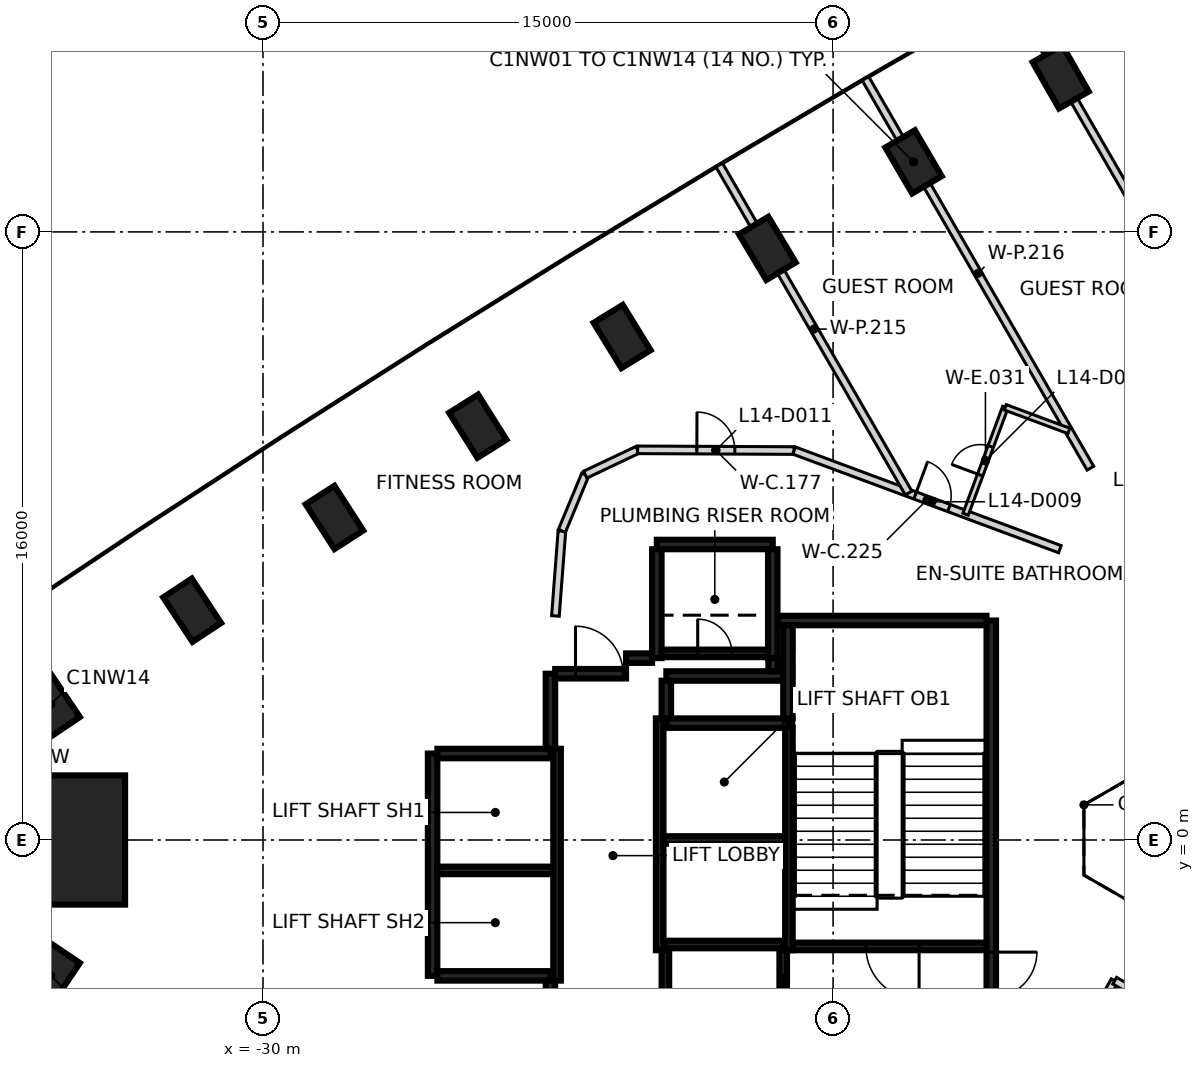
"""IFC4 building model, lengths in metres.
Left out: names, types, materials, properties, quantities, classifications, styles, units other than length and angle.
Written with IfcOpenShell. Run it as: python <this file> out.ifc"""

import sys

from ifc_helpers import new_model, si_unit, direction, frame, frame_2d, origin, origin_2d, place, context, subcontext, project, spatial, rectangle, extrude, element, fill, save


model = new_model("IFC4")
c1 = context("Model", 3, precision=1e-05, world=origin(), true_north=direction((0.0, 1.0)))
c2 = subcontext(c1, "Body", "Model", "MODEL_VIEW")
j1 = project(units=[si_unit("LENGTHUNIT", "METRE"), si_unit("PLANEANGLEUNIT", "RADIAN")], contexts=[c1])
p1 = place(None, origin())
s1 = spatial("IfcSite", under=j1, at=p1, CompositionType="ELEMENT")
p2 = place(p1, origin())
s2 = spatial("IfcBuilding", under=s1, at=p2, CompositionType="ELEMENT")
p3 = place(p2, frame((0.0, 0.0, 63.8)))
s3 = spatial("IfcBuildingStorey", under=s2, at=p3, CompositionType="ELEMENT", Elevation=63.8)
for number, where, z_axis, x_axis in (
    (1, (-9.011, 20.079, -0.475), (0.0, 0.0, 1.0), (-0.495, 0.869, 0.0)),
    (2, (-12.883, 17.844, -0.475), (0.0, 0.0, 1.0), (-0.505, 0.863, 0.0)),
    (3, (-16.73, 15.566, -0.475), (0.0, 0.0, 1.0), (-0.514, 0.858, 0.0)),
    (4, (-20.552, 13.248, -0.475), (0.0, 0.0, 1.0), (-0.523, 0.852, 0.0)),
    (5, (-24.349, 10.888, -0.475), (0.0, 0.0, 1.0), (-0.532, 0.846, 0.0)),
    (6, (-28.12, 8.488, -0.475), (0.0, 0.0, 1.0), (-0.541, 0.841, 0.0)),
    (7, (-31.865, 6.046, -0.475), (0.0, 0.0, 1.0), (-0.551, 0.835, 0.0)),
    (8, (-35.583, 3.565, -0.475), (0.0, 0.0, 1.0), (-0.559, 0.829, 0.0)),
    (9, (-35.583, -3.565, -0.475), (0.0, 0.0, 1.0), (0.559, 0.829, 0.0)),
):
    element("IfcColumn", number, at=place(p3, frame(where, z_axis=z_axis, x_axis=x_axis)), inside=s3, PredefinedType="COLUMN", context=c2, shape_type="SweptSolid", body=[
        extrude(rectangle(XDim=1.4, YDim=0.9, at=origin_2d()), origin(), (0.0, 0.0, 1.0), 3.6),
    ])
p4 = place(p3, frame((-35.729, 0.0, -0.475), z_axis=(0.0, 0.0, 1.0), x_axis=(1.0, 0.0, 0.0)))
e10 = element("IfcColumn", 10, at=p4, inside=s3, PredefinedType="COLUMN", context=c2, shape_type="SweptSolid", body=[
    extrude(rectangle(XDim=4.2, YDim=3.4, at=origin_2d()), origin(), (0.0, 0.0, 1.0), 3.6),
])
p5 = place(p3, frame((-10.837, 5.775, 0.0), z_axis=(0.0, 0.0, 1.0), x_axis=(0.0, -1.0, 0.0)))
e11 = element("IfcWall", 11, at=p5, inside=s3, PredefinedType="SHEAR", context=c2, shape_type="SweptSolid", body=[
    extrude(rectangle(XDim=11.55, YDim=0.25, at=frame_2d((5.775, 0.0))), origin(), (0.0, 0.0, 1.0), 3.125),
])
p6 = place(p5, frame((10.025, 0.0, 0.0)))
e12 = element("IfcOpeningElement", 12, at=p6, cuts=e11, PredefinedType="OPENING", context=c2, shape_type="SweptSolid", body=[
    extrude(rectangle(XDim=1.2, YDim=2.1, at=frame_2d((0.6, 1.05))), frame((0.0, 0.135, 0.0), z_axis=(0.0, -1.0, 0.0), x_axis=(1.0, 0.0, 0.0)), (0.0, 0.0, 1.0), 0.27),
])
p7 = place(p5, frame((8.725, 0.0, 0.0)))
e13 = element("IfcOpeningElement", 13, at=p7, cuts=e11, PredefinedType="OPENING", context=c2, shape_type="SweptSolid", body=[
    extrude(rectangle(XDim=1.2, YDim=2.1, at=frame_2d((0.6, 1.05))), frame((0.0, 0.135, 0.0), z_axis=(0.0, -1.0, 0.0), x_axis=(1.0, 0.0, 0.0)), (0.0, 0.0, 1.0), 0.27),
])
p8 = place(p3, frame((-25.537, -3.575, 0.0), z_axis=(0.0, 0.0, 1.0), x_axis=(0.0, 1.0, 0.0)))
e14 = element("IfcWall", 14, at=p8, inside=s3, PredefinedType="SHEAR", context=c2, shape_type="SweptSolid", body=[
    extrude(rectangle(XDim=5.85, YDim=0.25, at=frame_2d((2.925, 0.0))), origin(), (0.0, 0.0, 1.0), 3.125),
])
p9 = place(p3, frame((-16.472, 5.775, 0.0), z_axis=(0.0, 0.0, 1.0), x_axis=(1.0, 0.0, 0.0)))
e15 = element("IfcWall", 15, at=p9, inside=s3, PredefinedType="SHEAR", context=c2, shape_type="SweptSolid", body=[
    extrude(rectangle(XDim=5.51, YDim=0.25, at=frame_2d((2.755, 0.0))), origin(), (0.0, 0.0, 1.0), 3.125),
])
p10 = place(p3, frame((-19.387, 3.075, 0.0), z_axis=(0.0, 0.0, 1.0), x_axis=(1.0, 0.0, 0.0)))
e16 = element("IfcWall", 16, at=p10, inside=s3, PredefinedType="SHEAR", context=c2, shape_type="SweptSolid", body=[
    extrude(rectangle(XDim=3.2, YDim=0.25, at=frame_2d((1.6, 0.0))), origin(), (0.0, 0.0, 1.0), 3.125),
])
for number, where, z_axis, x_axis in (
    (17, (-22.437, -3.575, 0.0), (0.0, 0.0, 1.0), (-1.0, 0.0, 0.0)),
    (18, (-25.412, 2.275, 0.0), (0.0, 0.0, 1.0), (1.0, 0.0, 0.0)),
):
    element("IfcWall", number, at=place(p3, frame(where, z_axis=z_axis, x_axis=x_axis)), inside=s3, PredefinedType="SHEAR", context=c2, shape_type="SweptSolid", body=[
        extrude(rectangle(XDim=2.975, YDim=0.25, at=frame_2d((1.487, 0.0))), origin(), (0.0, 0.0, 1.0), 3.125),
    ])
p11 = place(p3, frame((-19.637, 7.775, 0.0), z_axis=(0.0, 0.0, 1.0), x_axis=(1.0, 0.0, 0.0)))
e19 = element("IfcWall", 19, at=p11, inside=s3, PredefinedType="SHEAR", context=c2, shape_type="SweptSolid", body=[
    extrude(rectangle(XDim=3.05, YDim=0.25, at=frame_2d((1.525, 0.0))), origin(), (0.0, 0.0, 1.0), 3.125),
])
for number, where, z_axis, x_axis in (
    (20, (-16.587, 7.65, 0.0), (0.0, 0.0, 1.0), (0.0, -1.0, 0.0)),
    (21, (-19.637, 4.785, 0.0), (0.0, 0.0, 1.0), (0.0, 1.0, 0.0)),
):
    element("IfcWall", number, at=place(p3, frame(where, z_axis=z_axis, x_axis=x_axis)), inside=s3, PredefinedType="SHEAR", context=c2, shape_type="SweptSolid", body=[
        extrude(rectangle(XDim=2.865, YDim=0.25, at=frame_2d((1.432, 0.0))), origin(), (0.0, 0.0, 1.0), 3.125),
    ])
p12 = place(p3, frame((-16.302, 4.315, 0.0), z_axis=(0.0, 0.0, 1.0), x_axis=(-1.0, 0.0, 0.0)))
e22 = element("IfcWall", 22, at=p12, inside=s3, PredefinedType="SHEAR", context=c2, shape_type="SweptSolid", body=[
    extrude(rectangle(XDim=3.085, YDim=0.25, at=frame_2d((1.542, 0.0))), origin(), (0.0, 0.0, 1.0), 3.125),
])
p13 = place(p3, frame((-16.187, 3.2, 0.0), z_axis=(0.0, 0.0, 1.0), x_axis=(0.0, 1.0, 0.0)))
e23 = element("IfcWall", 23, at=p13, inside=s3, PredefinedType="SHEAR", context=c2, shape_type="SweptSolid", body=[
    extrude(rectangle(XDim=2.449, YDim=0.25, at=frame_2d((1.225, 0.0))), origin(), (0.0, 0.0, 1.0), 3.125),
])
p14 = place(p3, frame((-22.437, 2.4, 0.0), z_axis=(0.0, 0.0, 1.0), x_axis=(0.0, 1.0, 0.0)))
e24 = element("IfcWall", 24, at=p14, inside=s3, PredefinedType="SHEAR", context=c2, shape_type="SweptSolid", body=[
    extrude(rectangle(XDim=1.975, YDim=0.25, at=frame_2d((0.987, 0.0))), origin(), (0.0, 0.0, 1.0), 3.125),
])
p15 = place(p3, frame((-22.437, -5.55, 0.0), z_axis=(0.0, 0.0, 1.0), x_axis=(0.0, 1.0, 0.0)))
e25 = element("IfcWall", 25, at=p15, inside=s3, PredefinedType="SHEAR", context=c2, shape_type="SweptSolid", body=[
    extrude(rectangle(XDim=1.849, YDim=0.25, at=frame_2d((0.925, 0.0))), origin(), (0.0, 0.0, 1.0), 3.125),
])
p16 = place(p3, frame((-22.312, 4.375, 0.0), z_axis=(0.0, 0.0, 1.0), x_axis=(1.0, 0.0, 0.0)))
e26 = element("IfcWall", 26, at=p16, inside=s3, PredefinedType="SHEAR", context=c2, shape_type="SweptSolid", body=[
    extrude(rectangle(XDim=1.865, YDim=0.25, at=frame_2d((0.932, 0.0))), origin(), (0.0, 0.0, 1.0), 3.125),
])
p17 = place(p16, frame((0.535, 0.0, 0.0)))
e27 = element("IfcOpeningElement", 27, at=p17, cuts=e26, PredefinedType="OPENING", context=c2, shape_type="SweptSolid", body=[
    extrude(rectangle(XDim=1.25, YDim=2.1, at=frame_2d((0.625, 1.05))), frame((0.0, 0.135, 0.0), z_axis=(0.0, -1.0, 0.0), x_axis=(1.0, 0.0, 0.0)), (0.0, 0.0, 1.0), 0.27),
])
p18 = place(p3, frame((-19.387, 4.19, 0.0), z_axis=(0.0, 0.0, 1.0), x_axis=(0.0, -1.0, 0.0)))
e28 = element("IfcWall", 28, at=p18, inside=s3, PredefinedType="SHEAR", context=c2, shape_type="SweptSolid", body=[
    extrude(rectangle(XDim=0.989, YDim=0.25, at=frame_2d((0.495, 0.0))), origin(), (0.0, 0.0, 1.0), 3.125),
])
p19 = place(p3, frame((-20.447, 4.785, 0.0), z_axis=(0.0, 0.0, 1.0), x_axis=(1.0, 0.0, 0.0)))
e29 = element("IfcWall", 29, at=p19, inside=s3, PredefinedType="SHEAR", context=c2, shape_type="SweptSolid", body=[
    extrude(rectangle(XDim=0.685, YDim=0.25, at=frame_2d((0.342, 0.0))), origin(), (0.0, 0.0, 1.0), 3.125),
])
p20 = place(p3, frame((-16.577, 4.785, 0.0), z_axis=(0.0, 0.0, 1.0), x_axis=(0.0, -1.0, 0.0)))
e30 = element("IfcWall", 30, at=p20, inside=s3, PredefinedType="SHEAR", context=c2, shape_type="SweptSolid", body=[
    extrude(rectangle(XDim=0.344, YDim=0.25, at=frame_2d((0.172, 0.0))), origin(), (0.0, 0.0, 1.0), 3.125),
])
p21 = place(p3, frame((-16.162, 2.951, 0.0), z_axis=(0.0, 0.0, 1.0), x_axis=(0.0, -1.0, 0.0)))
e31 = element("IfcWall", 31, at=p21, inside=s3, PredefinedType="SHEAR", context=c2, shape_type="SweptSolid", body=[
    extrude(rectangle(XDim=5.851, YDim=0.2, at=frame_2d((2.925, 0.0))), origin(), (0.0, 0.0, 1.0), 3.125),
])
for number, where, z_axis, x_axis in (
    (32, (-19.562, -2.9, 0.0), (0.0, 0.0, 1.0), (0.0, 1.0, 0.0)),
    (33, (-22.262, 2.4, 0.0), (0.0, 0.0, 1.0), (0.0, -1.0, 0.0)),
):
    element("IfcWall", number, at=place(p3, frame(where, z_axis=z_axis, x_axis=x_axis)), inside=s3, PredefinedType="SHEAR", context=c2, shape_type="SweptSolid", body=[
        extrude(rectangle(XDim=6.1, YDim=0.2, at=frame_2d((3.05, 0.0))), origin(), (0.0, 0.0, 1.0), 3.125),
    ])
p22 = place(p3, frame((-10.963, -2.8, 0.0), z_axis=(0.0, 0.0, 1.0), x_axis=(-1.0, 0.0, 0.0)))
e34 = element("IfcWall", 34, at=p22, inside=s3, PredefinedType="SHEAR", context=c2, shape_type="SweptSolid", body=[
    extrude(rectangle(XDim=5.098, YDim=0.2, at=frame_2d((2.549, 0.0))), origin(), (0.0, 0.0, 1.0), 3.125),
])
p23 = place(p22, frame((1.774, 0.0, 0.0)))
e35 = element("IfcOpeningElement", 35, at=p23, cuts=e34, PredefinedType="OPENING", context=c2, shape_type="SweptSolid", body=[
    extrude(rectangle(XDim=1.4, YDim=2.1, at=frame_2d((0.7, 1.05))), frame((0.0, 0.11, 0.0), z_axis=(0.0, -1.0, 0.0), x_axis=(1.0, 0.0, 0.0)), (0.0, 0.0, 1.0), 0.22),
])
p24 = place(p3, frame((-16.263, 0.0, 0.0), z_axis=(0.0, 0.0, 1.0), x_axis=(-1.0, 0.0, 0.0)))
e36 = element("IfcWall", 36, at=p24, inside=s3, PredefinedType="SHEAR", context=c2, shape_type="SweptSolid", body=[
    extrude(rectangle(XDim=3.198, YDim=0.2, at=frame_2d((1.599, 0.0))), origin(), (0.0, 0.0, 1.0), 3.125),
])
p25 = place(p3, frame((-22.363, -0.8, 0.0), z_axis=(0.0, 0.0, 1.0), x_axis=(-1.0, 0.0, 0.0)))
e37 = element("IfcWall", 37, at=p25, inside=s3, PredefinedType="SHEAR", context=c2, shape_type="SweptSolid", body=[
    extrude(rectangle(XDim=3.048, YDim=0.2, at=frame_2d((1.524, 0.0))), origin(), (0.0, 0.0, 1.0), 3.125),
])
p26 = place(p3, frame((-19.511, 4.91, 0.0), z_axis=(0.0, 0.0, 1.0), x_axis=(1.0, 0.0, 0.0)))
e38 = element("IfcWall", 38, at=p26, inside=s3, PredefinedType="SHEAR", context=c2, shape_type="SweptSolid", body=[
    extrude(rectangle(XDim=2.798, YDim=0.2, at=frame_2d((1.399, 0.0))), origin(), (0.0, 0.0, 1.0), 3.125),
])
p27 = place(p26, frame((0.949, 0.0, 0.0)))
e39 = element("IfcOpeningElement", 39, at=p27, cuts=e38, PredefinedType="OPENING", context=c2, shape_type="SweptSolid", body=[
    extrude(rectangle(XDim=0.9, YDim=2.1, at=frame_2d((0.45, 1.05))), frame((0.0, 0.11, 0.0), z_axis=(0.0, -1.0, 0.0), x_axis=(1.0, 0.0, 0.0)), (0.0, 0.0, 1.0), 0.22),
])
p28 = place(p3, frame((-19.412, -2.75, 0.0), z_axis=(0.0, 0.0, 1.0), x_axis=(1.0, 0.0, 0.0)))
e40 = element("IfcWall", 40, at=p28, inside=s3, PredefinedType="SHEAR", context=c2, shape_type="SweptSolid", body=[
    extrude(rectangle(XDim=3.1, YDim=0.2, at=frame_2d((1.55, 0.0))), origin(), (0.0, 0.0, 1.0), 3.125),
])
p29 = place(p3, frame((-16.312, -2.898, 0.0), z_axis=(0.0, 0.0, 1.0), x_axis=(0.0, -1.0, 0.0)))
e41 = element("IfcWall", 41, at=p29, inside=s3, PredefinedType="SHEAR", context=c2, shape_type="SweptSolid", body=[
    extrude(rectangle(XDim=2.651, YDim=0.2, at=frame_2d((1.325, 0.0))), origin(), (0.0, 0.0, 1.0), 3.125),
])
p30 = place(p29, frame((0.652, 0.0, 0.0)))
e42 = element("IfcOpeningElement", 42, at=p30, cuts=e41, PredefinedType="OPENING", context=c2, shape_type="SweptSolid", body=[
    extrude(rectangle(XDim=1.3, YDim=2.1, at=frame_2d((0.65, 1.05))), frame((0.0, 0.11, 0.0), z_axis=(0.0, -1.0, 0.0), x_axis=(1.0, 0.0, 0.0)), (0.0, 0.0, 1.0), 0.22),
])
p31 = place(p3, frame((-19.412, -5.549, 0.0), z_axis=(0.0, 0.0, 1.0), x_axis=(0.0, 1.0, 0.0)))
e43 = element("IfcWall", 43, at=p31, inside=s3, PredefinedType="SHEAR", context=c2, shape_type="SweptSolid", body=[
    extrude(rectangle(XDim=2.651, YDim=0.2, at=frame_2d((1.325, 0.0))), origin(), (0.0, 0.0, 1.0), 3.125),
])
p32 = place(p3, frame((-22.306, 5.895, 0.0), z_axis=(0.0, 0.0, 1.0), x_axis=(0.076246699626, 0.997088983389, 0.0)))
e44 = element("IfcWall", 44, at=p32, inside=s3, PredefinedType="PARTITIONING", context=c2, shape_type="SweptSolid", body=[
    extrude(rectangle(XDim=2.241, YDim=0.2, at=frame_2d((1.121, 0.0))), origin(), (0.0, 0.0, 1.0), 3.125),
])
p33 = place(p3, frame((-22.135, 8.134, 0.0), z_axis=(0.0, 0.0, 1.0), x_axis=(0.383208453534, 0.923661886807, 0.0)))
e45 = element("IfcWall", 45, at=p33, inside=s3, PredefinedType="PARTITIONING", context=c2, shape_type="SweptSolid", body=[
    extrude(rectangle(XDim=1.602, YDim=0.2, at=frame_2d((0.801, 0.0))), origin(), (0.0, 0.0, 1.0), 3.125),
])
p34 = place(p3, frame((-21.521, 9.614, 0.0), z_axis=(0.0, 0.0, 1.0), x_axis=(0.904083527367, 0.427355795028, 0.0)))
e46 = element("IfcWall", 46, at=p34, inside=s3, PredefinedType="PARTITIONING", context=c2, shape_type="SweptSolid", body=[
    extrude(rectangle(XDim=1.523, YDim=0.2, at=frame_2d((0.761, 0.0))), origin(), (0.0, 0.0, 1.0), 3.125),
])
p35 = place(p3, frame((-20.143, 10.266, 0.0), z_axis=(0.0, 0.0, 1.0), x_axis=(0.999989297417, -0.004626559416, 0.0)))
e47 = element("IfcWall", 47, at=p35, inside=s3, PredefinedType="PARTITIONING", context=c2, shape_type="SweptSolid", body=[
    extrude(rectangle(XDim=4.116, YDim=0.2, at=frame_2d((2.058, 0.0))), origin(), (0.0, 0.0, 1.0), 3.125),
])
p36 = place(p35, frame((1.558, 0.0, 0.0)))
e48 = element("IfcOpeningElement", 48, at=p36, cuts=e47, PredefinedType="OPENING", context=c2, shape_type="SweptSolid", body=[
    extrude(rectangle(XDim=1.0, YDim=2.1, at=frame_2d((0.5, 1.05))), frame((0.0, 0.11, 0.0), z_axis=(0.0, -1.0, 0.0), x_axis=(1.0, 0.0, 0.0)), (0.0, 0.0, 1.0), 0.22),
])
p37 = place(p3, frame((-16.026, 10.247, 0.0), z_axis=(0.0, 0.0, 1.0), x_axis=(0.937540909117, -0.347875040397, 0.0)))
e49 = element("IfcWall", 49, at=p37, inside=s3, PredefinedType="PARTITIONING", context=c2, shape_type="SweptSolid", body=[
    extrude(rectangle(XDim=7.459, YDim=0.2, at=frame_2d((3.729, 0.0))), origin(), (0.0, 0.0, 1.0), 3.125),
])
p38 = place(p37, frame((3.396, 0.0, 0.0)))
e50 = element("IfcOpeningElement", 50, at=p38, cuts=e49, PredefinedType="OPENING", context=c2, shape_type="SweptSolid", body=[
    extrude(rectangle(XDim=0.95, YDim=2.1, at=frame_2d((0.475, 1.05))), frame((0.0, 0.11, 0.0), z_axis=(0.0, -1.0, 0.0), x_axis=(1.0, 0.0, 0.0)), (0.0, 0.0, 1.0), 0.22),
])
p39 = place(p3, frame((-8.223, -4.8, 0.0), z_axis=(0.0, 0.0, 1.0), x_axis=(0.499866914522, 0.866102227088, 0.0)))
e51 = element("IfcWall", 51, at=p39, inside=s3, PredefinedType="PARTITIONING", context=c2, shape_type="SweptSolid", body=[
    extrude(rectangle(XDim=1.268, YDim=0.2, at=frame_2d((0.634, 0.0))), origin(), (0.0, 0.0, 1.0), 3.125),
])
p40 = place(p3, frame((-7.589, -3.702, 0.0), z_axis=(0.0, 0.0, 1.0), x_axis=(0.865995139556, -0.500052415518, 0.0)))
e52 = element("IfcWall", 52, at=p40, inside=s3, PredefinedType="PARTITIONING", context=c2, shape_type="SweptSolid", body=[
    extrude(rectangle(XDim=8.689, YDim=0.2, at=frame_2d((4.344, 0.0))), origin(), (0.0, 0.0, 1.0), 3.125),
])
p41 = place(p40, frame((0.749, 0.0, 0.0)))
e53 = element("IfcOpeningElement", 53, at=p41, cuts=e52, PredefinedType="OPENING", context=c2, shape_type="SweptSolid", body=[
    extrude(rectangle(XDim=1.0, YDim=2.1, at=frame_2d((0.5, 1.05))), frame((0.0, 0.11, 0.0), z_axis=(0.0, -1.0, 0.0), x_axis=(1.0, 0.0, 0.0)), (0.0, 0.0, 1.0), 0.22),
])
p42 = place(p40, frame((5.819, 0.0, 0.0)))
e54 = element("IfcOpeningElement", 54, at=p42, cuts=e52, PredefinedType="OPENING", context=c2, shape_type="SweptSolid", body=[
    extrude(rectangle(XDim=0.95, YDim=2.1, at=frame_2d((0.475, 1.05))), frame((0.0, 0.11, 0.0), z_axis=(0.0, -1.0, 0.0), x_axis=(1.0, 0.0, 0.0)), (0.0, 0.0, 1.0), 0.22),
])
p43 = place(p3, frame((-17.996, 17.758, 0.0), z_axis=(0.0, 0.0, 1.0), x_axis=(0.500046945013, -0.865998298372, 0.0)))
e55 = element("IfcWall", 55, at=p43, inside=s3, PredefinedType="PARTITIONING", context=c2, shape_type="SweptSolid", body=[
    extrude(rectangle(XDim=9.964, YDim=0.2, at=frame_2d((4.982, 0.0))), origin(), (0.0, 0.0, 1.0), 3.125),
])
p44 = place(p3, frame((-14.149, 20.035, 0.0), z_axis=(0.0, 0.0, 1.0), x_axis=(0.500022967158, -0.866012143284, 0.0)))
e56 = element("IfcWall", 56, at=p44, inside=s3, PredefinedType="PARTITIONING", context=c2, shape_type="SweptSolid", body=[
    extrude(rectangle(XDim=11.838, YDim=0.2, at=frame_2d((5.919, 0.0))), origin(), (0.0, 0.0, 1.0), 3.125),
])
p45 = place(p3, frame((-10.276, 22.271, 0.0), z_axis=(0.0, 0.0, 1.0), x_axis=(0.499975954304, -0.866039286129, 0.0)))
e57 = element("IfcWall", 57, at=p45, inside=s3, PredefinedType="PARTITIONING", context=c2, shape_type="SweptSolid", body=[
    extrude(rectangle(XDim=17.424, YDim=0.2, at=frame_2d((8.712, 0.0))), origin(), (0.0, 0.0, 1.0), 3.125),
])
p46 = place(p3, frame((-11.513, 8.572, 0.0), z_axis=(0.0, 0.0, 1.0), x_axis=(0.347929104424, 0.937520846859, 0.0)))
e58 = element("IfcWall", 58, at=p46, inside=s3, PredefinedType="PARTITIONING", context=c2, shape_type="SweptSolid", body=[
    extrude(rectangle(XDim=3.0, YDim=0.15, at=frame_2d((1.5, 0.0))), origin(), (0.0, 0.0, 1.0), 3.125),
])
p47 = place(p46, frame((1.1, 0.0, 0.0)))
e59 = element("IfcOpeningElement", 59, at=p47, cuts=e58, PredefinedType="OPENING", context=c2, shape_type="SweptSolid", body=[
    extrude(rectangle(XDim=0.8, YDim=2.1, at=frame_2d((0.4, 1.05))), frame((0.0, 0.085, 0.0), z_axis=(0.0, -1.0, 0.0), x_axis=(1.0, 0.0, 0.0)), (0.0, 0.0, 1.0), 0.17),
])
p48 = place(p3, frame((-10.469, 11.385, 0.0), z_axis=(0.0, 0.0, 1.0), x_axis=(0.937487768635, -0.348018223173, 0.0)))
e60 = element("IfcWall", 60, at=p48, inside=s3, PredefinedType="PARTITIONING", context=c2, shape_type="SweptSolid", body=[
    extrude(rectangle(XDim=1.785, YDim=0.15, at=frame_2d((0.892, 0.0))), origin(), (0.0, 0.0, 1.0), 3.125),
])
p49 = place(p30, origin())
e61 = element("IfcDoor", 61, at=p49, inside=s3, OperationType="SLIDING_TO_RIGHT", PredefinedType="DOOR", context=c2, shape_type="SweptSolid", body=[
    extrude(rectangle(XDim=1.3, YDim=2.1, at=frame_2d((0.65, 1.05))), frame((0.0, 0.025, 0.0), z_axis=(0.0, -1.0, 0.0), x_axis=(1.0, 0.0, 0.0)), (0.0, 0.0, 1.0), 0.05),
])
fill(e42, e61)
p50 = place(p17, origin())
e62 = element("IfcDoor", 62, at=p50, inside=s3, OperationType="SINGLE_SWING_LEFT", PredefinedType="DOOR", context=c2, shape_type="SweptSolid", body=[
    extrude(rectangle(XDim=1.25, YDim=2.1, at=frame_2d((0.625, 1.05))), frame((0.0, 0.025, 0.0), z_axis=(0.0, -1.0, 0.0), x_axis=(1.0, 0.0, 0.0)), (0.0, 0.0, 1.0), 0.05),
])
fill(e27, e62)
p51 = place(p7, origin())
e63 = element("IfcDoor", 63, at=p51, inside=s3, OperationType="SINGLE_SWING_RIGHT", PredefinedType="DOOR", context=c2, shape_type="SweptSolid", body=[
    extrude(rectangle(XDim=1.2, YDim=2.1, at=frame_2d((0.6, 1.05))), frame((0.0, 0.025, 0.0), z_axis=(0.0, -1.0, 0.0), x_axis=(1.0, 0.0, 0.0)), (0.0, 0.0, 1.0), 0.05),
])
fill(e13, e63)
p52 = place(p23, origin())
e64 = element("IfcDoor", 64, at=p52, inside=s3, OperationType="SINGLE_SWING_RIGHT", PredefinedType="DOOR", context=c2, shape_type="SweptSolid", body=[
    extrude(rectangle(XDim=1.4, YDim=2.1, at=frame_2d((0.7, 1.05))), frame((0.0, 0.025, 0.0), z_axis=(0.0, -1.0, 0.0), x_axis=(1.0, 0.0, 0.0)), (0.0, 0.0, 1.0), 0.05),
])
fill(e35, e64)
p53 = place(p27, origin())
e65 = element("IfcDoor", 65, at=p53, inside=s3, OperationType="SINGLE_SWING_LEFT", PredefinedType="DOOR", context=c2, shape_type="SweptSolid", body=[
    extrude(rectangle(XDim=0.9, YDim=2.1, at=frame_2d((0.45, 1.05))), frame((0.0, 0.025, 0.0), z_axis=(0.0, -1.0, 0.0), x_axis=(1.0, 0.0, 0.0)), (0.0, 0.0, 1.0), 0.05),
])
fill(e39, e65)
p54 = place(p38, origin())
e66 = element("IfcDoor", 66, at=p54, inside=s3, OperationType="SINGLE_SWING_LEFT", PredefinedType="DOOR", context=c2, shape_type="SweptSolid", body=[
    extrude(rectangle(XDim=0.95, YDim=2.1, at=frame_2d((0.475, 1.05))), frame((0.0, 0.025, 0.0), z_axis=(0.0, -1.0, 0.0), x_axis=(1.0, 0.0, 0.0)), (0.0, 0.0, 1.0), 0.05),
])
fill(e50, e66)
p55 = place(p47, origin())
e67 = element("IfcDoor", 67, at=p55, inside=s3, OperationType="SINGLE_SWING_LEFT", PredefinedType="DOOR", context=c2, shape_type="SweptSolid", body=[
    extrude(rectangle(XDim=0.8, YDim=2.1, at=frame_2d((0.4, 1.05))), frame((0.0, 0.025, 0.0), z_axis=(0.0, -1.0, 0.0), x_axis=(1.0, 0.0, 0.0)), (0.0, 0.0, 1.0), 0.05),
])
fill(e59, e67)
p56 = place(p36, origin())
e68 = element("IfcDoor", 68, at=p56, inside=s3, OperationType="SINGLE_SWING_LEFT", PredefinedType="DOOR", context=c2, shape_type="SweptSolid", body=[
    extrude(rectangle(XDim=1.0, YDim=2.1, at=frame_2d((0.5, 1.05))), frame((0.0, 0.025, 0.0), z_axis=(0.0, -1.0, 0.0), x_axis=(1.0, 0.0, 0.0)), (0.0, 0.0, 1.0), 0.05),
])
fill(e48, e68)
save(model, sys.argv[1])
